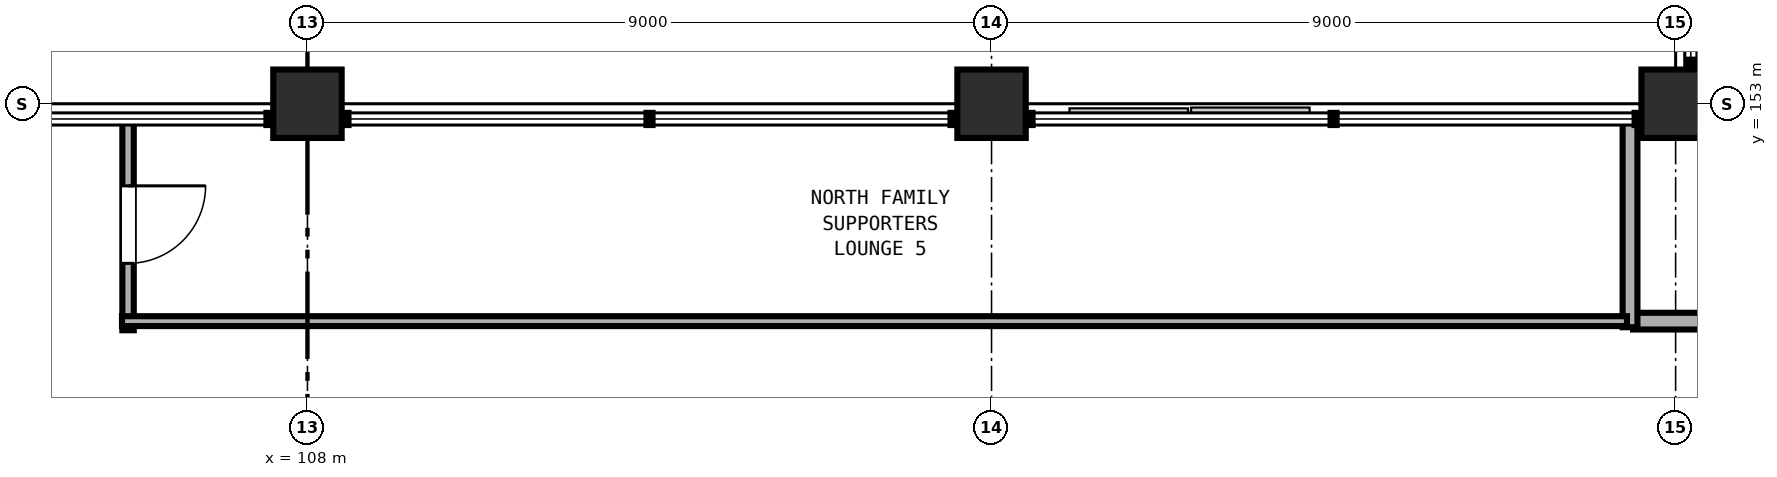
"""IFC4 building model, lengths in metres.
Left out: names, types, materials, properties, quantities, classifications, styles, units other than length and angle.
Written with IfcOpenShell. Run it as: python <this file> out.ifc"""

import sys

from ifc_helpers import new_model, si_unit, direction, frame, frame_2d, origin, origin_2d, place, context, subcontext, project, spatial, rectangle, extrude, element, fill, save


model = new_model("IFC4")
c1 = context("Model", 3, precision=1e-05, world=origin(), true_north=direction((0.0, 1.0)))
c2 = subcontext(c1, "Body", "Model", "MODEL_VIEW")
j1 = project(units=[si_unit("LENGTHUNIT", "METRE"), si_unit("PLANEANGLEUNIT", "RADIAN")], contexts=[c1])
p1 = place(None, origin())
s1 = spatial("IfcSite", under=j1, at=p1, CompositionType="ELEMENT")
p2 = place(p1, origin())
s2 = spatial("IfcBuilding", under=s1, at=p2, CompositionType="ELEMENT")
p3 = place(p2, frame((0.0, 0.0, 4.8)))
s3 = spatial("IfcBuildingStorey", under=s2, at=p3, CompositionType="ELEMENT", Elevation=4.8)
for number, where, z_axis, x_axis in (
    (1, (108.0, 153.0, 0.0), (0.0, 0.0, 1.0), (1.0, 0.0, 0.0)),
    (2, (117.0, 153.0, 0.0), (0.0, 0.0, 1.0), (1.0, 0.0, 0.0)),
    (3, (126.0, 153.0, 0.0), (0.0, 0.0, 1.0), (1.0, 0.0, 0.0)),
):
    element("IfcColumn", number, at=place(p3, frame(where, z_axis=z_axis, x_axis=x_axis)), inside=s3, PredefinedType="COLUMN", context=c2, shape_type="SweptSolid", body=[
        extrude(rectangle(XDim=0.9, YDim=0.9, at=origin_2d()), origin(), (0.0, 0.0, 1.0), 4.8),
    ])
p4 = place(p3, frame((145.24, 150.14, 0.0), z_axis=(0.0, 0.0, 1.0), x_axis=(-1.0, 0.0, 0.0)))
e4 = element("IfcWall", 4, at=p4, inside=s3, PredefinedType="PARTITIONING", context=c2, shape_type="SweptSolid", body=[
    extrude(rectangle(XDim=19.8, YDim=0.22, at=frame_2d((9.9, 0.0))), origin(), (0.0, 0.0, 1.0), 3.28),
])
p5 = place(p3, frame((125.4, 150.06, 0.0), z_axis=(0.0, 0.0, 1.0), x_axis=(0.0, 1.0, 0.0)))
e5 = element("IfcWall", 5, at=p5, inside=s3, PredefinedType="PARTITIONING", context=c2, shape_type="SweptSolid", body=[
    extrude(rectangle(XDim=2.707, YDim=0.195, at=frame_2d((1.354, 0.0))), origin(), (0.0, 0.0, 1.0), 3.28),
])
p6 = place(p3, frame((105.64, 152.8, 0.0), z_axis=(0.0, 0.0, 1.0), x_axis=(0.0, -1.0, 0.0)))
e6 = element("IfcWall", 6, at=p6, inside=s3, PredefinedType="PARTITIONING", context=c2, shape_type="SweptSolid", body=[
    extrude(rectangle(XDim=2.78, YDim=0.15, at=frame_2d((1.39, 0.0))), origin(), (0.0, 0.0, 1.0), 3.28),
])
p7 = place(p6, frame((0.88, 0.0, 0.0)))
e7 = element("IfcOpeningElement", 7, at=p7, cuts=e6, PredefinedType="OPENING", context=c2, shape_type="SweptSolid", body=[
    extrude(rectangle(XDim=1.02, YDim=2.16, at=frame_2d((0.51, 1.08))), frame((0.0, 0.085, 0.0), z_axis=(0.0, -1.0, 0.0), x_axis=(1.0, 0.0, 0.0)), (0.0, 0.0, 1.0), 0.17),
])
p8 = place(p3, frame((125.36, 150.14, 0.0), z_axis=(0.0, 0.0, 1.0), x_axis=(-1.0, 0.0, 0.0)))
e8 = element("IfcWall", 8, at=p8, inside=s3, PredefinedType="PARTITIONING", context=c2, shape_type="SweptSolid", body=[
    extrude(rectangle(XDim=19.8, YDim=0.13, at=frame_2d((9.9, 0.0))), origin(), (0.0, 0.0, 1.0), 3.28),
])
p9 = place(p7, origin())
e9 = element("IfcDoor", 9, at=p9, inside=s3, OperationType="SINGLE_SWING_LEFT", PredefinedType="DOOR", context=c2, shape_type="SweptSolid", body=[
    extrude(rectangle(XDim=1.02, YDim=2.16, at=frame_2d((0.51, 1.08))), frame((0.0, 0.025, 0.0), z_axis=(0.0, -1.0, 0.0), x_axis=(1.0, 0.0, 0.0)), (0.0, 0.0, 1.0), 0.05),
])
fill(e7, e9)
save(model, sys.argv[1])
